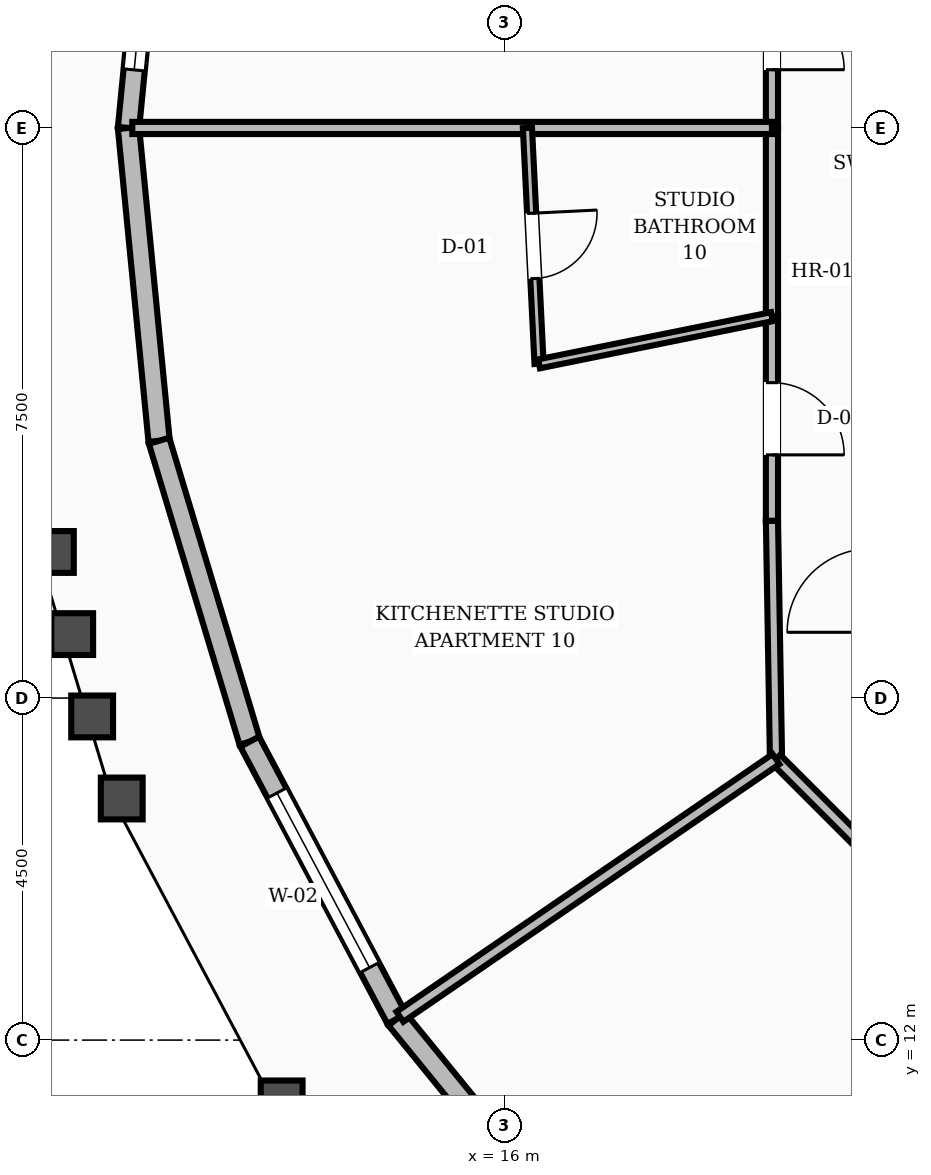
"""IFC4 building model, lengths in metres.
Left out: names, types, materials, properties, quantities, classifications, styles, units other than length and angle.
Written with IfcOpenShell. Run it as: python <this file> out.ifc"""

import sys

from ifc_helpers import new_model, si_unit, direction, frame, frame_2d, origin, place, context, subcontext, project, spatial, rectangle, extrude, element, fill, save


model = new_model("IFC4")
c1 = context("Model", 3, precision=1e-05, world=origin(), true_north=direction((0.0, 1.0)))
c2 = subcontext(c1, "Body", "Model", "MODEL_VIEW")
j1 = project(units=[si_unit("LENGTHUNIT", "METRE"), si_unit("PLANEANGLEUNIT", "RADIAN")], contexts=[c1])
p1 = place(None, origin())
s1 = spatial("IfcSite", under=j1, at=p1, CompositionType="ELEMENT")
p2 = place(p1, origin())
s2 = spatial("IfcBuilding", under=s1, at=p2, CompositionType="ELEMENT")
p3 = place(p2, frame((0.0, 0.0, 250.8)))
s3 = spatial("IfcBuildingStorey", under=s2, at=p3, CompositionType="ELEMENT", Elevation=250.8)
p4 = place(p3, frame((11.457, 28.116, 0.0), z_axis=(0.0, 0.0, 1.0), x_axis=(-0.097346706508, -0.995250530636, 0.0)))
e1 = element("IfcWall", 1, at=p4, inside=s3, PredefinedType="STANDARD", context=c2, shape_type="SweptSolid", body=[
    extrude(rectangle(XDim=4.135, YDim=0.28, at=frame_2d((2.068, 0.0))), origin(), (0.0, 0.0, 1.0), 2.88),
])
p5 = place(p4, frame((0.768, 0.0, 0.8)))
e2 = element("IfcOpeningElement", 2, at=p5, cuts=e1, PredefinedType="OPENING", context=c2, shape_type="SweptSolid", body=[
    extrude(rectangle(XDim=2.6, YDim=1.65, at=frame_2d((1.3, 0.825))), frame((0.0, 0.15, 0.0), z_axis=(0.0, -1.0, 0.0), x_axis=(1.0, 0.0, 0.0)), (0.0, 0.0, 1.0), 0.3),
])
p6 = place(p3, frame((11.055, 24.0, 0.0), z_axis=(0.0, 0.0, 1.0), x_axis=(0.097346706508, -0.995250530636, 0.0)))
e3 = element("IfcWall", 3, at=p6, inside=s3, PredefinedType="STANDARD", context=c2, shape_type="SweptSolid", body=[
    extrude(rectangle(XDim=4.135, YDim=0.28, at=frame_2d((2.068, 0.0))), origin(), (0.0, 0.0, 1.0), 2.88),
])
p7 = place(p3, frame((11.457, 19.884, 0.0), z_axis=(0.0, 0.0, 1.0), x_axis=(0.288361061872, -0.957521748054, 0.0)))
e4 = element("IfcWall", 4, at=p7, inside=s3, PredefinedType="STANDARD", context=c2, shape_type="SweptSolid", body=[
    extrude(rectangle(XDim=4.133, YDim=0.28, at=frame_2d((2.067, 0.0))), origin(), (0.0, 0.0, 1.0), 2.88),
])
p8 = place(p3, frame((12.649, 15.926, 0.0), z_axis=(0.0, 0.0, 1.0), x_axis=(0.468745936162, -0.883333033081, 0.0)))
e5 = element("IfcWall", 5, at=p8, inside=s3, PredefinedType="STANDARD", context=c2, shape_type="SweptSolid", body=[
    extrude(rectangle(XDim=4.129, YDim=0.28, at=frame_2d((2.064, 0.0))), origin(), (0.0, 0.0, 1.0), 2.88),
])
p9 = place(p8, frame((0.765, 0.0, 0.8)))
e6 = element("IfcOpeningElement", 6, at=p9, cuts=e5, PredefinedType="OPENING", context=c2, shape_type="SweptSolid", body=[
    extrude(rectangle(XDim=2.6, YDim=1.65, at=frame_2d((1.3, 0.825))), frame((0.0, 0.15, 0.0), z_axis=(0.0, -1.0, 0.0), x_axis=(1.0, 0.0, 0.0)), (0.0, 0.0, 1.0), 0.3),
])
p10 = place(p3, frame((14.585, 12.279, 0.0), z_axis=(0.0, 0.0, 1.0), x_axis=(0.631637370097, -0.775263976138, 0.0)))
e7 = element("IfcWall", 7, at=p10, inside=s3, PredefinedType="STANDARD", context=c2, shape_type="SweptSolid", body=[
    extrude(rectangle(XDim=4.124, YDim=0.28, at=frame_2d((2.062, 0.0))), origin(), (0.0, 0.0, 1.0), 2.88),
])
p11 = place(p3, frame((19.52, 26.482, 0.0), z_axis=(0.0, 0.0, 1.0), x_axis=(0.0, -1.0, 0.0)))
e8 = element("IfcWall", 8, at=p11, inside=s3, PredefinedType="SOLIDWALL", context=c2, shape_type="SweptSolid", body=[
    extrude(rectangle(XDim=2.482, YDim=0.16, at=frame_2d((1.241, 0.0))), origin(), (0.0, 0.0, 1.0), 2.87),
])
p12 = place(p11, frame((0.766, 0.0, 0.0)))
e9 = element("IfcOpeningElement", 9, at=p12, cuts=e8, PredefinedType="OPENING", context=c2, shape_type="SweptSolid", body=[
    extrude(rectangle(XDim=0.95, YDim=2.1, at=frame_2d((0.475, 1.05))), frame((0.0, 0.09, 0.0), z_axis=(0.0, -1.0, 0.0), x_axis=(1.0, 0.0, 0.0)), (0.0, 0.0, 1.0), 0.18),
])
p13 = place(p3, frame((19.52, 24.0, 0.0), z_axis=(0.0, 0.0, 1.0), x_axis=(0.0, -1.0, 0.0)))
e10 = element("IfcWall", 10, at=p13, inside=s3, PredefinedType="SOLIDWALL", context=c2, shape_type="SweptSolid", body=[
    extrude(rectangle(XDim=2.482, YDim=0.16, at=frame_2d((1.241, 0.0))), origin(), (0.0, 0.0, 1.0), 2.87),
])
p14 = place(p3, frame((19.52, 21.518, 0.0), z_axis=(0.0, 0.0, 1.0), x_axis=(0.0, -1.0, 0.0)))
e11 = element("IfcWall", 11, at=p14, inside=s3, PredefinedType="SOLIDWALL", context=c2, shape_type="SweptSolid", body=[
    extrude(rectangle(XDim=2.687, YDim=0.16, at=frame_2d((1.344, 0.0))), origin(), (0.0, 0.0, 1.0), 2.87),
])
p15 = place(p14, frame((0.868, 0.0, 0.0)))
e12 = element("IfcOpeningElement", 12, at=p15, cuts=e11, PredefinedType="OPENING", context=c2, shape_type="SweptSolid", body=[
    extrude(rectangle(XDim=0.95, YDim=2.1, at=frame_2d((0.475, 1.05))), frame((0.0, 0.09, 0.0), z_axis=(0.0, -1.0, 0.0), x_axis=(1.0, 0.0, 0.0)), (0.0, 0.0, 1.0), 0.18),
])
p16 = place(p3, frame((19.52, 18.831, 0.0), z_axis=(0.0, 0.0, 1.0), x_axis=(0.016981035134, -0.999855811828, 0.0)))
e13 = element("IfcWall", 13, at=p16, inside=s3, PredefinedType="SOLIDWALL", context=c2, shape_type="SweptSolid", body=[
    extrude(rectangle(XDim=3.134, YDim=0.16, at=frame_2d((1.567, 0.0))), origin(), (0.0, 0.0, 1.0), 2.87),
])
p17 = place(p3, frame((19.573, 15.697, 0.0), z_axis=(0.0, 0.0, 1.0), x_axis=(0.707106781187, -0.707106781187, 0.0)))
e14 = element("IfcWall", 14, at=p17, inside=s3, PredefinedType="SOLIDWALL", context=c2, shape_type="SweptSolid", body=[
    extrude(rectangle(XDim=2.916, YDim=0.16, at=frame_2d((1.458, 0.0))), origin(), (0.0, 0.0, 1.0), 2.87),
])
p18 = place(p3, frame((19.52, 24.0, 0.0), z_axis=(0.0, 0.0, 1.0), x_axis=(-1.0, 0.0, 0.0)))
e15 = element("IfcWall", 15, at=p18, inside=s3, PredefinedType="SOLIDWALL", context=c2, shape_type="SweptSolid", body=[
    extrude(rectangle(XDim=8.415, YDim=0.16, at=frame_2d((4.208, 0.0))), origin(), (0.0, 0.0, 1.0), 2.87),
])
p19 = place(p3, frame((16.303, 24.0, 0.0), z_axis=(0.0, 0.0, 1.0), x_axis=(0.049271319057, -0.99878543097, 0.0)))
e16 = element("IfcWall", 16, at=p19, inside=s3, PredefinedType="PARTITIONING", context=c2, shape_type="SweptSolid", body=[
    extrude(rectangle(XDim=3.107, YDim=0.12, at=frame_2d((1.553, 0.0))), origin(), (0.0, 0.0, 1.0), 2.87),
])
p20 = place(p19, frame((1.124, 0.0, 0.0)))
e17 = element("IfcOpeningElement", 17, at=p20, cuts=e16, PredefinedType="OPENING", context=c2, shape_type="SweptSolid", body=[
    extrude(rectangle(XDim=0.86, YDim=2.1, at=frame_2d((0.43, 1.05))), frame((0.0, 0.07, 0.0), z_axis=(0.0, -1.0, 0.0), x_axis=(1.0, 0.0, 0.0)), (0.0, 0.0, 1.0), 0.14),
])
p21 = place(p3, frame((19.52, 21.518, 0.0), z_axis=(0.0, 0.0, 1.0), x_axis=(-0.980094066387, -0.198533677325, 0.0)))
e18 = element("IfcWall", 18, at=p21, inside=s3, PredefinedType="PARTITIONING", context=c2, shape_type="SweptSolid", body=[
    extrude(rectangle(XDim=3.126, YDim=0.12, at=frame_2d((1.563, 0.0))), origin(), (0.0, 0.0, 1.0), 2.87),
])
p22 = place(p3, frame((19.573, 15.697, 0.0), z_axis=(0.0, 0.0, 1.0), x_axis=(-0.824943620796, -0.56521502325, 0.0)))
e19 = element("IfcWall", 19, at=p22, inside=s3, PredefinedType="SOLIDWALL", context=c2, shape_type="SweptSolid", body=[
    extrude(rectangle(XDim=5.997, YDim=0.16, at=frame_2d((2.999, 0.0))), origin(), (0.0, 0.0, 1.0), 2.87),
])
p23 = place(p5, origin())
e20 = element("IfcWindow", 20, at=p23, inside=s3, PartitioningType="SINGLE_PANEL", PredefinedType="WINDOW", context=c2, shape_type="SweptSolid", body=[
    extrude(rectangle(XDim=2.6, YDim=1.65, at=frame_2d((1.3, 0.825))), frame((0.0, 0.03, 0.0), z_axis=(0.0, -1.0, 0.0), x_axis=(1.0, 0.0, 0.0)), (0.0, 0.0, 1.0), 0.06),
])
fill(e2, e20)
p24 = place(p9, origin())
e21 = element("IfcWindow", 21, at=p24, inside=s3, PartitioningType="SINGLE_PANEL", PredefinedType="WINDOW", context=c2, shape_type="SweptSolid", body=[
    extrude(rectangle(XDim=2.6, YDim=1.65, at=frame_2d((1.3, 0.825))), frame((0.0, 0.03, 0.0), z_axis=(0.0, -1.0, 0.0), x_axis=(1.0, 0.0, 0.0)), (0.0, 0.0, 1.0), 0.06),
])
fill(e6, e21)
p25 = place(p12, origin())
e22 = element("IfcDoor", 22, at=p25, inside=s3, OperationType="SINGLE_SWING_RIGHT", PredefinedType="DOOR", context=c2, shape_type="SweptSolid", body=[
    extrude(rectangle(XDim=0.95, YDim=2.1, at=frame_2d((0.475, 1.05))), frame((0.0, 0.025, 0.0), z_axis=(0.0, -1.0, 0.0), x_axis=(1.0, 0.0, 0.0)), (0.0, 0.0, 1.0), 0.05),
])
fill(e9, e22)
p26 = place(p20, origin())
e23 = element("IfcDoor", 23, at=p26, inside=s3, OperationType="SINGLE_SWING_LEFT", PredefinedType="DOOR", context=c2, shape_type="SweptSolid", body=[
    extrude(rectangle(XDim=0.86, YDim=2.1, at=frame_2d((0.43, 1.05))), frame((0.0, 0.025, 0.0), z_axis=(0.0, -1.0, 0.0), x_axis=(1.0, 0.0, 0.0)), (0.0, 0.0, 1.0), 0.05),
])
fill(e17, e23)
p27 = place(p15, origin())
e24 = element("IfcDoor", 24, at=p27, inside=s3, OperationType="SINGLE_SWING_RIGHT", PredefinedType="DOOR", context=c2, shape_type="SweptSolid", body=[
    extrude(rectangle(XDim=0.95, YDim=2.1, at=frame_2d((0.475, 1.05))), frame((0.0, 0.025, 0.0), z_axis=(0.0, -1.0, 0.0), x_axis=(1.0, 0.0, 0.0)), (0.0, 0.0, 1.0), 0.05),
])
fill(e12, e24)
save(model, sys.argv[1])
